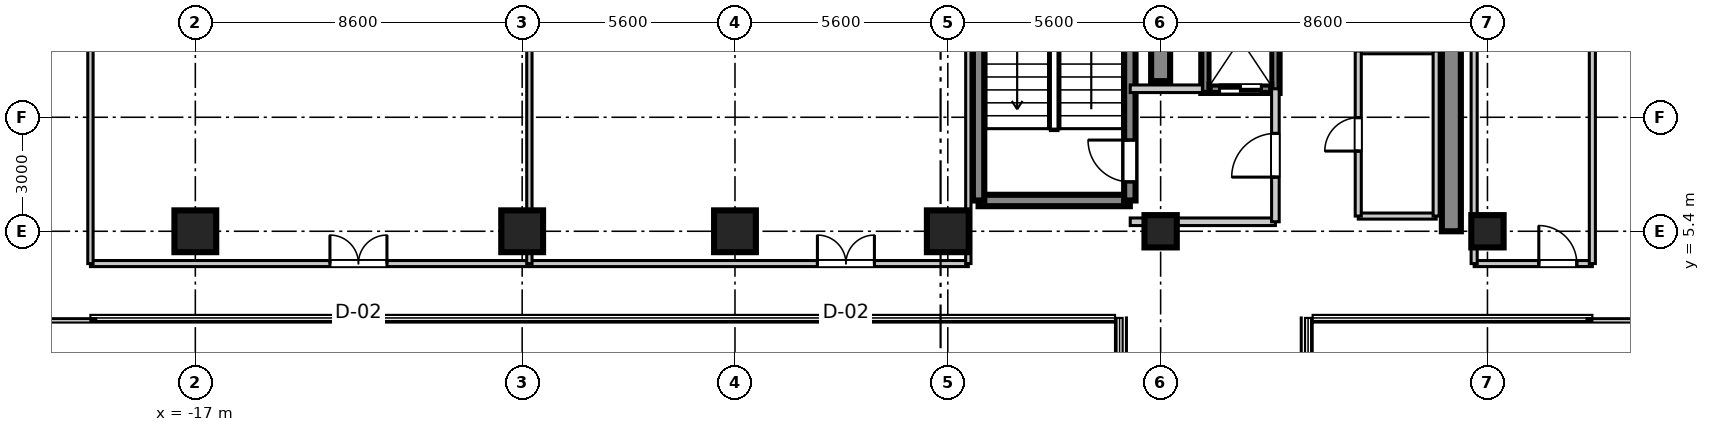
"""IFC4 building model, lengths in metres.
Left out: names, types, materials, properties, quantities, classifications, styles, units other than length and angle.
Written with IfcOpenShell. Run it as: python <this file> out.ifc"""

import sys

from ifc_helpers import new_model, si_unit, direction, frame, frame_2d, origin, origin_2d, place, context, subcontext, project, spatial, rectangle, extrude, source, transform, mapped, element, fill, save


model = new_model("IFC4")
c1 = context("Model", 3, precision=1e-05, world=origin(), true_north=direction((0.0, 1.0)))
c2 = subcontext(c1, "Body", "Model", "MODEL_VIEW")
j1 = project(units=[si_unit("LENGTHUNIT", "METRE"), si_unit("PLANEANGLEUNIT", "RADIAN")], contexts=[c1])
p1 = place(None, origin())
s1 = spatial("IfcSite", under=j1, at=p1, CompositionType="ELEMENT")
p2 = place(p1, origin())
s2 = spatial("IfcBuilding", under=s1, at=p2, CompositionType="ELEMENT")
p3 = place(p2, frame((0.0, 0.0, 185.5)))
s3 = spatial("IfcBuildingStorey", under=s2, at=p3, CompositionType="ELEMENT", Elevation=185.5)
m1 = source(origin(), c2, "Body", "SweptSolid", [
    extrude(rectangle(XDim=1.1, YDim=1.1, at=origin_2d()), origin(), (0.0, 0.0, 1.0), 3.605),
])
for number, where, z_axis, x_axis in (
    (1, (-17.0, 5.4, 0.0), (0.0, 0.0, 1.0), (1.0, 0.0, 0.0)),
    (2, (-8.4, 5.4, 0.0), (0.0, 0.0, 1.0), (1.0, 0.0, 0.0)),
    (3, (-2.8, 5.4, 0.0), (0.0, 0.0, 1.0), (1.0, 0.0, 0.0)),
    (4, (2.8, 5.4, 0.0), (0.0, 0.0, 1.0), (1.0, 0.0, 0.0)),
):
    element("IfcColumn", number, at=place(p3, frame(where, z_axis=z_axis, x_axis=x_axis)), inside=s3, PredefinedType="COLUMN", context=c2, shape_type="MappedRepresentation", body=[
        mapped(m1, transform((0.0, 0.0, 0.0), scale=1.0)),
    ])
m2 = source(origin(), c2, "Body", "SweptSolid", [
    extrude(rectangle(XDim=0.85, YDim=0.85, at=origin_2d()), origin(), (0.0, 0.0, 1.0), 3.605),
])
for number, where, z_axis, x_axis in (
    (5, (8.4, 5.4, 0.0), (0.0, 0.0, 1.0), (1.0, 0.0, 0.0)),
    (6, (17.0, 5.4, 0.0), (0.0, 0.0, 1.0), (1.0, 0.0, 0.0)),
):
    element("IfcColumn", number, at=place(p3, frame(where, z_axis=z_axis, x_axis=x_axis)), inside=s3, PredefinedType="PILASTER", context=c2, shape_type="MappedRepresentation", body=[
        mapped(m2, transform((0.0, 0.0, 0.0), scale=1.0)),
    ])
m3 = source(origin(), c2, "Body", "SweptSolid", [
    extrude(rectangle(XDim=7.65, YDim=0.5, at=frame_2d((3.825, 0.0))), origin(), (0.0, 0.0, 1.0), 3.39),
])
p4 = place(p3, frame((8.4, 9.35, 0.0), z_axis=(0.0, 0.0, 1.0), x_axis=(0.0, 1.0, 0.0)))
e7 = element("IfcWall", 7, at=p4, inside=s3, PredefinedType="SHEAR", context=c2, shape_type="MappedRepresentation", body=[
    mapped(m3, transform((0.0, 0.0, 0.0), scale=1.0)),
])
m4 = source(origin(), c2, "Body", "SweptSolid", [
    extrude(rectangle(XDim=11.6, YDim=0.5, at=frame_2d((5.8, 0.0))), origin(), (0.0, 0.0, 1.0), 3.39),
])
p5 = place(p3, frame((16.05, 5.4, 0.0), z_axis=(0.0, 0.0, 1.0), x_axis=(0.0, 1.0, 0.0)))
e8 = element("IfcWall", 8, at=p5, inside=s3, PredefinedType="SHEAR", context=c2, shape_type="MappedRepresentation", body=[
    mapped(m4, transform((0.0, 0.0, 0.0), scale=1.0)),
])
m5 = source(origin(), c2, "Body", "SweptSolid", [
    extrude(rectangle(XDim=3.98, YDim=0.3, at=frame_2d((1.99, 0.0))), origin(), (0.0, 0.0, 1.0), 3.39),
])
p6 = place(p3, frame((3.61, 6.21, 0.0), z_axis=(0.0, 0.0, 1.0), x_axis=(1.0, 0.0, 0.0)))
e9 = element("IfcWall", 9, at=p6, inside=s3, PredefinedType="SHEAR", context=c2, shape_type="MappedRepresentation", body=[
    mapped(m5, transform((0.0, 0.0, 0.0), scale=1.0)),
])
m6 = source(origin(), c2, "Body", "SweptSolid", [
    extrude(rectangle(XDim=9.38, YDim=0.3, at=frame_2d((4.69, 0.0))), origin(), (0.0, 0.0, 1.0), 3.39),
])
p7 = place(p3, frame((3.61, 6.21, 0.0), z_axis=(0.0, 0.0, 1.0), x_axis=(0.0, 1.0, 0.0)))
e10 = element("IfcWall", 10, at=p7, inside=s3, PredefinedType="SHEAR", context=c2, shape_type="MappedRepresentation", body=[
    mapped(m6, transform((0.0, 0.0, 0.0), scale=1.0)),
])
p8 = place(p3, frame((7.59, 6.21, 0.0), z_axis=(0.0, 0.0, 1.0), x_axis=(0.0, 1.0, 0.0)))
e11 = element("IfcWall", 11, at=p8, inside=s3, PredefinedType="SHEAR", context=c2, shape_type="MappedRepresentation", body=[
    mapped(m6, transform((0.0, 0.0, 0.0), scale=1.0)),
])
p9 = place(p8, frame((0.49, 0.0, 0.0)))
e12 = element("IfcOpeningElement", 12, at=p9, cuts=e11, PredefinedType="OPENING", context=c2, shape_type="SweptSolid", body=[
    extrude(rectangle(XDim=1.1, YDim=2.15, at=frame_2d((0.55, 1.075))), frame((0.0, 0.16, 0.0), z_axis=(0.0, -1.0, 0.0), x_axis=(1.0, 0.0, 0.0)), (0.0, 0.0, 1.0), 0.32),
])
m7 = source(origin(), c2, "Body", "SweptSolid", [
    extrude(rectangle(XDim=2.82, YDim=0.22, at=frame_2d((1.41, 0.0))), origin(), (0.0, 0.0, 1.0), 3.39),
])
for number, where, z_axis, x_axis in (
    (13, (9.58, 9.04, 0.0), (0.0, 0.0, 1.0), (0.0, 1.0, 0.0)),
    (14, (11.42, 9.04, 0.0), (0.0, 0.0, 1.0), (0.0, 1.0, 0.0)),
):
    element("IfcWall", number, at=place(p3, frame(where, z_axis=z_axis, x_axis=x_axis)), inside=s3, PredefinedType="SHEAR", context=c2, shape_type="MappedRepresentation", body=[
        mapped(m7, transform((0.0, 0.0, 0.0), scale=1.0)),
    ])
m8 = source(origin(), c2, "Body", "SweptSolid", [
    extrude(rectangle(XDim=1.62, YDim=0.22, at=frame_2d((0.81, 0.0))), origin(), (0.0, 0.0, 1.0), 3.39),
])
p10 = place(p3, frame((9.69, 9.15, 0.0), z_axis=(0.0, 0.0, 1.0), x_axis=(1.0, 0.0, 0.0)))
e15 = element("IfcWall", 15, at=p10, inside=s3, PredefinedType="SHEAR", context=c2, shape_type="MappedRepresentation", body=[
    mapped(m8, transform((0.0, 0.0, 0.0), scale=1.0)),
])
p11 = place(p10, frame((0.26, 0.0, 0.0)))
e16 = element("IfcOpeningElement", 16, at=p11, cuts=e15, PredefinedType="OPENING", context=c2, shape_type="SweptSolid", body=[
    extrude(rectangle(XDim=1.1, YDim=2.2, at=frame_2d((0.55, 1.1))), frame((0.0, 0.12, 0.0), z_axis=(0.0, -1.0, 0.0), x_axis=(1.0, 0.0, 0.0)), (0.0, 0.0, 1.0), 0.24),
])
m9 = source(origin(), c2, "Body", "SweptSolid", [
    extrude(rectangle(XDim=3.82, YDim=0.2, at=frame_2d((1.91, 0.0))), origin(), (0.0, 0.0, 1.0), 2.73),
])
p12 = place(p3, frame((7.6, 5.65, 0.0), z_axis=(0.0, 0.0, 1.0), x_axis=(1.0, 0.0, 0.0)))
e17 = element("IfcWall", 17, at=p12, inside=s3, PredefinedType="PARTITIONING", context=c2, shape_type="MappedRepresentation", body=[
    mapped(m9, transform((0.0, 0.0, 0.0), scale=1.0)),
])
m10 = source(origin(), c2, "Body", "SweptSolid", [
    extrude(rectangle(XDim=1.9, YDim=0.2, at=frame_2d((0.95, 0.0))), origin(), (0.0, 0.0, 1.0), 2.73),
])
p13 = place(p3, frame((7.6, 9.15, 0.0), z_axis=(0.0, 0.0, 1.0), x_axis=(1.0, 0.0, 0.0)))
e18 = element("IfcWall", 18, at=p13, inside=s3, PredefinedType="PARTITIONING", context=c2, shape_type="MappedRepresentation", body=[
    mapped(m10, transform((0.0, 0.0, 0.0), scale=1.0)),
])
m11 = source(origin(), c2, "Body", "SweptSolid", [
    extrude(rectangle(XDim=3.5, YDim=0.2, at=frame_2d((1.75, 0.0))), origin(), (0.0, 0.0, 1.0), 2.73),
])
p14 = place(p3, frame((11.42, 5.65, 0.0), z_axis=(0.0, 0.0, 1.0), x_axis=(0.0, 1.0, 0.0)))
e19 = element("IfcWall", 19, at=p14, inside=s3, PredefinedType="PARTITIONING", context=c2, shape_type="MappedRepresentation", body=[
    mapped(m11, transform((0.0, 0.0, 0.0), scale=1.0)),
])
p15 = place(p14, frame((1.175, 0.0, 0.0)))
e20 = element("IfcOpeningElement", 20, at=p15, cuts=e19, PredefinedType="OPENING", context=c2, shape_type="SweptSolid", body=[
    extrude(rectangle(XDim=1.15, YDim=2.15, at=frame_2d((0.575, 1.075))), frame((0.0, 0.11, 0.0), z_axis=(0.0, -1.0, 0.0), x_axis=(1.0, 0.0, 0.0)), (0.0, 0.0, 1.0), 0.22),
])
m12 = source(origin(), c2, "Body", "SweptSolid", [
    extrude(rectangle(XDim=2.05, YDim=0.16, at=frame_2d((1.025, 0.0))), origin(), (0.0, 0.0, 1.0), 2.73),
])
for number, where, z_axis, x_axis in (
    (21, (13.6, 5.8, 0.0), (0.0, 0.0, 1.0), (1.0, 0.0, 0.0)),
    (22, (13.6, 10.15, 0.0), (0.0, 0.0, 1.0), (1.0, 0.0, 0.0)),
):
    element("IfcWall", number, at=place(p3, frame(where, z_axis=z_axis, x_axis=x_axis)), inside=s3, PredefinedType="PARTITIONING", context=c2, shape_type="MappedRepresentation", body=[
        mapped(m12, transform((0.0, 0.0, 0.0), scale=1.0)),
    ])
m13 = source(origin(), c2, "Body", "SweptSolid", [
    extrude(rectangle(XDim=4.35, YDim=0.16, at=frame_2d((2.175, 0.0))), origin(), (0.0, 0.0, 1.0), 2.73),
])
p16 = place(p3, frame((13.6, 5.8, 0.0), z_axis=(0.0, 0.0, 1.0), x_axis=(0.0, 1.0, 0.0)))
e23 = element("IfcWall", 23, at=p16, inside=s3, PredefinedType="PARTITIONING", context=c2, shape_type="MappedRepresentation", body=[
    mapped(m13, transform((0.0, 0.0, 0.0), scale=1.0)),
])
p17 = place(p16, frame((1.71, 0.0, 0.0)))
e24 = element("IfcOpeningElement", 24, at=p17, cuts=e23, PredefinedType="OPENING", context=c2, shape_type="SweptSolid", body=[
    extrude(rectangle(XDim=0.88, YDim=2.1, at=frame_2d((0.44, 1.05))), frame((0.0, 0.09, 0.0), z_axis=(0.0, -1.0, 0.0), x_axis=(1.0, 0.0, 0.0)), (0.0, 0.0, 1.0), 0.18),
])
p18 = place(p3, frame((15.65, 5.8, 0.0), z_axis=(0.0, 0.0, 1.0), x_axis=(0.0, 1.0, 0.0)))
e25 = element("IfcWall", 25, at=p18, inside=s3, PredefinedType="PARTITIONING", context=c2, shape_type="MappedRepresentation", body=[
    mapped(m13, transform((0.0, 0.0, 0.0), scale=1.0)),
])
m14 = source(origin(), c2, "Body", "SweptSolid", [
    extrude(rectangle(XDim=3.11, YDim=0.16, at=frame_2d((1.555, 0.0))), origin(), (0.0, 0.0, 1.0), 2.73),
])
p19 = place(p3, frame((16.65, 4.55, 0.0), z_axis=(0.0, 0.0, 1.0), x_axis=(1.0, 0.0, 0.0)))
e26 = element("IfcWall", 26, at=p19, inside=s3, PredefinedType="PARTITIONING", context=c2, shape_type="MappedRepresentation", body=[
    mapped(m14, transform((0.0, 0.0, 0.0), scale=1.0)),
])
p20 = place(p19, frame((1.701, 0.0, 0.0)))
e27 = element("IfcOpeningElement", 27, at=p20, cuts=e26, PredefinedType="OPENING", context=c2, shape_type="SweptSolid", body=[
    extrude(rectangle(XDim=1.0, YDim=2.1, at=frame_2d((0.5, 1.05))), frame((0.0, 0.09, 0.0), z_axis=(0.0, -1.0, 0.0), x_axis=(1.0, 0.0, 0.0)), (0.0, 0.0, 1.0), 0.18),
])
m15 = source(origin(), c2, "Body", "SweptSolid", [
    extrude(rectangle(XDim=17.95, YDim=0.16, at=frame_2d((8.975, 0.0))), origin(), (0.0, 0.0, 1.0), 2.73),
])
p21 = place(p3, frame((16.65, 4.55, 0.0), z_axis=(0.0, 0.0, 1.0), x_axis=(0.0, 1.0, 0.0)))
e28 = element("IfcWall", 28, at=p21, inside=s3, PredefinedType="PARTITIONING", context=c2, shape_type="MappedRepresentation", body=[
    mapped(m15, transform((0.0, 0.0, 0.0), scale=1.0)),
])
m16 = source(origin(), c2, "Body", "SweptSolid", [
    extrude(rectangle(XDim=16.53, YDim=0.16, at=frame_2d((8.265, 0.0))), origin(), (0.0, 0.0, 1.0), 2.73),
])
p22 = place(p3, frame((19.76, 4.55, 0.0), z_axis=(0.0, 0.0, 1.0), x_axis=(0.0, 1.0, 0.0)))
e29 = element("IfcWall", 29, at=p22, inside=s3, PredefinedType="PARTITIONING", context=c2, shape_type="MappedRepresentation", body=[
    mapped(m16, transform((0.0, 0.0, 0.0), scale=1.0)),
])
m17 = source(origin(), c2, "Body", "SweptSolid", [
    extrude(rectangle(XDim=23.1, YDim=0.16, at=frame_2d((11.55, 0.0))), origin(), (0.0, 0.0, 1.0), 2.73),
])
p23 = place(p3, frame((-19.76, 4.55, 0.0), z_axis=(0.0, 0.0, 1.0), x_axis=(1.0, 0.0, 0.0)))
e30 = element("IfcWall", 30, at=p23, inside=s3, PredefinedType="PARTITIONING", context=c2, shape_type="MappedRepresentation", body=[
    mapped(m17, transform((0.0, 0.0, 0.0), scale=1.0)),
])
p24 = place(p23, frame((6.302, 0.0, 0.0)))
e31 = element("IfcOpeningElement", 31, at=p24, cuts=e30, PredefinedType="OPENING", context=c2, shape_type="SweptSolid", body=[
    extrude(rectangle(XDim=1.5, YDim=2.15, at=frame_2d((0.75, 1.075))), frame((0.0, 0.09, 0.0), z_axis=(0.0, -1.0, 0.0), x_axis=(1.0, 0.0, 0.0)), (0.0, 0.0, 1.0), 0.18),
])
p25 = place(p23, frame((19.129, 0.0, 0.0)))
e32 = element("IfcOpeningElement", 32, at=p25, cuts=e30, PredefinedType="OPENING", context=c2, shape_type="SweptSolid", body=[
    extrude(rectangle(XDim=1.5, YDim=2.15, at=frame_2d((0.75, 1.075))), frame((0.0, 0.09, 0.0), z_axis=(0.0, -1.0, 0.0), x_axis=(1.0, 0.0, 0.0)), (0.0, 0.0, 1.0), 0.18),
])
m18 = source(origin(), c2, "Body", "SweptSolid", [
    extrude(rectangle(XDim=16.53, YDim=0.14, at=frame_2d((8.265, 0.0))), origin(), (0.0, 0.0, 1.0), 2.73),
])
p26 = place(p3, frame((-19.76, 4.55, 0.0), z_axis=(0.0, 0.0, 1.0), x_axis=(0.0, 1.0, 0.0)))
e33 = element("IfcWall", 33, at=p26, inside=s3, PredefinedType="PARTITIONING", context=c2, shape_type="MappedRepresentation", body=[
    mapped(m18, transform((0.0, 0.0, 0.0), scale=1.0)),
])
m19 = source(origin(), c2, "Body", "SweptSolid", [
    extrude(rectangle(XDim=17.95, YDim=0.14, at=frame_2d((8.975, 0.0))), origin(), (0.0, 0.0, 1.0), 2.73),
])
for number, where, z_axis, x_axis in (
    (34, (3.34, 4.55, 0.0), (0.0, 0.0, 1.0), (0.0, 1.0, 0.0)),
    (35, (-8.21, 4.55, 0.0), (0.0, 0.0, 1.0), (0.0, 1.0, 0.0)),
):
    element("IfcWall", number, at=place(p3, frame(where, z_axis=z_axis, x_axis=x_axis)), inside=s3, PredefinedType="PARTITIONING", context=c2, shape_type="MappedRepresentation", body=[
        mapped(m19, transform((0.0, 0.0, 0.0), scale=1.0)),
    ])
m20 = source(origin(), c2, "Body", "SweptSolid", [
    extrude(rectangle(XDim=1.1, YDim=2.15, at=frame_2d((0.55, 1.075))), frame((0.0, 0.025, 0.0), z_axis=(0.0, -1.0, 0.0), x_axis=(1.0, 0.0, 0.0)), (0.0, 0.0, 1.0), 0.05),
])
p27 = place(p9, origin())
e36 = element("IfcDoor", 36, at=p27, inside=s3, OperationType="SINGLE_SWING_RIGHT", PredefinedType="DOOR", context=c2, shape_type="MappedRepresentation", body=[
    mapped(m20, transform((0.0, 0.0, 0.0), scale=1.0)),
])
fill(e12, e36)
m21 = source(origin(), c2, "Body", "SweptSolid", [
    extrude(rectangle(XDim=1.1, YDim=2.2, at=frame_2d((0.55, 1.1))), frame((0.0, 0.025, 0.0), z_axis=(0.0, -1.0, 0.0), x_axis=(1.0, 0.0, 0.0)), (0.0, 0.0, 1.0), 0.05),
])
p28 = place(p11, frame((1.1, 0.0, 0.0), z_axis=(0.0, 0.0, 1.0), x_axis=(-1.0, 0.0, 0.0)))
e37 = element("IfcDoor", 37, at=p28, inside=s3, OperationType="DOUBLE_DOOR_SLIDING", PredefinedType="DOOR", context=c2, shape_type="MappedRepresentation", body=[
    mapped(m21, transform((0.0, 0.0, 0.0), scale=1.0)),
])
fill(e16, e37)
m22 = source(origin(), c2, "Body", "SweptSolid", [
    extrude(rectangle(XDim=1.15, YDim=2.15, at=frame_2d((0.575, 1.075))), frame((0.0, 0.025, 0.0), z_axis=(0.0, -1.0, 0.0), x_axis=(1.0, 0.0, 0.0)), (0.0, 0.0, 1.0), 0.05),
])
p29 = place(p15, frame((1.15, 0.0, 0.0), z_axis=(0.0, 0.0, 1.0), x_axis=(-1.0, 0.0, 0.0)))
e38 = element("IfcDoor", 38, at=p29, inside=s3, OperationType="SINGLE_SWING_LEFT", PredefinedType="DOOR", context=c2, shape_type="MappedRepresentation", body=[
    mapped(m22, transform((0.0, 0.0, 0.0), scale=1.0)),
])
fill(e20, e38)
m23 = source(origin(), c2, "Body", "SweptSolid", [
    extrude(rectangle(XDim=0.88, YDim=2.1, at=frame_2d((0.44, 1.05))), frame((0.0, 0.025, 0.0), z_axis=(0.0, -1.0, 0.0), x_axis=(1.0, 0.0, 0.0)), (0.0, 0.0, 1.0), 0.05),
])
p30 = place(p17, frame((0.88, 0.0, 0.0), z_axis=(0.0, 0.0, 1.0), x_axis=(-1.0, 0.0, 0.0)))
e39 = element("IfcDoor", 39, at=p30, inside=s3, OperationType="SINGLE_SWING_LEFT", PredefinedType="DOOR", context=c2, shape_type="MappedRepresentation", body=[
    mapped(m23, transform((0.0, 0.0, 0.0), scale=1.0)),
])
fill(e24, e39)
m24 = source(origin(), c2, "Body", "SweptSolid", [
    extrude(rectangle(XDim=1.0, YDim=2.1, at=frame_2d((0.5, 1.05))), frame((0.0, 0.025, 0.0), z_axis=(0.0, -1.0, 0.0), x_axis=(1.0, 0.0, 0.0)), (0.0, 0.0, 1.0), 0.05),
])
p31 = place(p20, origin())
e40 = element("IfcDoor", 40, at=p31, inside=s3, OperationType="SINGLE_SWING_LEFT", PredefinedType="DOOR", context=c2, shape_type="MappedRepresentation", body=[
    mapped(m24, transform((0.0, 0.0, 0.0), scale=1.0)),
])
fill(e27, e40)
m25 = source(origin(), c2, "Body", "SweptSolid", [
    extrude(rectangle(XDim=1.5, YDim=2.15, at=frame_2d((0.75, 1.075))), frame((0.0, 0.025, 0.0), z_axis=(0.0, -1.0, 0.0), x_axis=(1.0, 0.0, 0.0)), (0.0, 0.0, 1.0), 0.05),
])
p32 = place(p24, origin())
e41 = element("IfcDoor", 41, at=p32, inside=s3, OperationType="DOUBLE_DOOR_SINGLE_SWING", PredefinedType="DOOR", context=c2, shape_type="MappedRepresentation", body=[
    mapped(m25, transform((0.0, 0.0, 0.0), scale=1.0)),
])
fill(e31, e41)
p33 = place(p25, origin())
e42 = element("IfcDoor", 42, at=p33, inside=s3, OperationType="DOUBLE_DOOR_SINGLE_SWING", PredefinedType="DOOR", context=c2, shape_type="MappedRepresentation", body=[
    mapped(m25, transform((0.0, 0.0, 0.0), scale=1.0)),
])
fill(e32, e42)
save(model, sys.argv[1])
